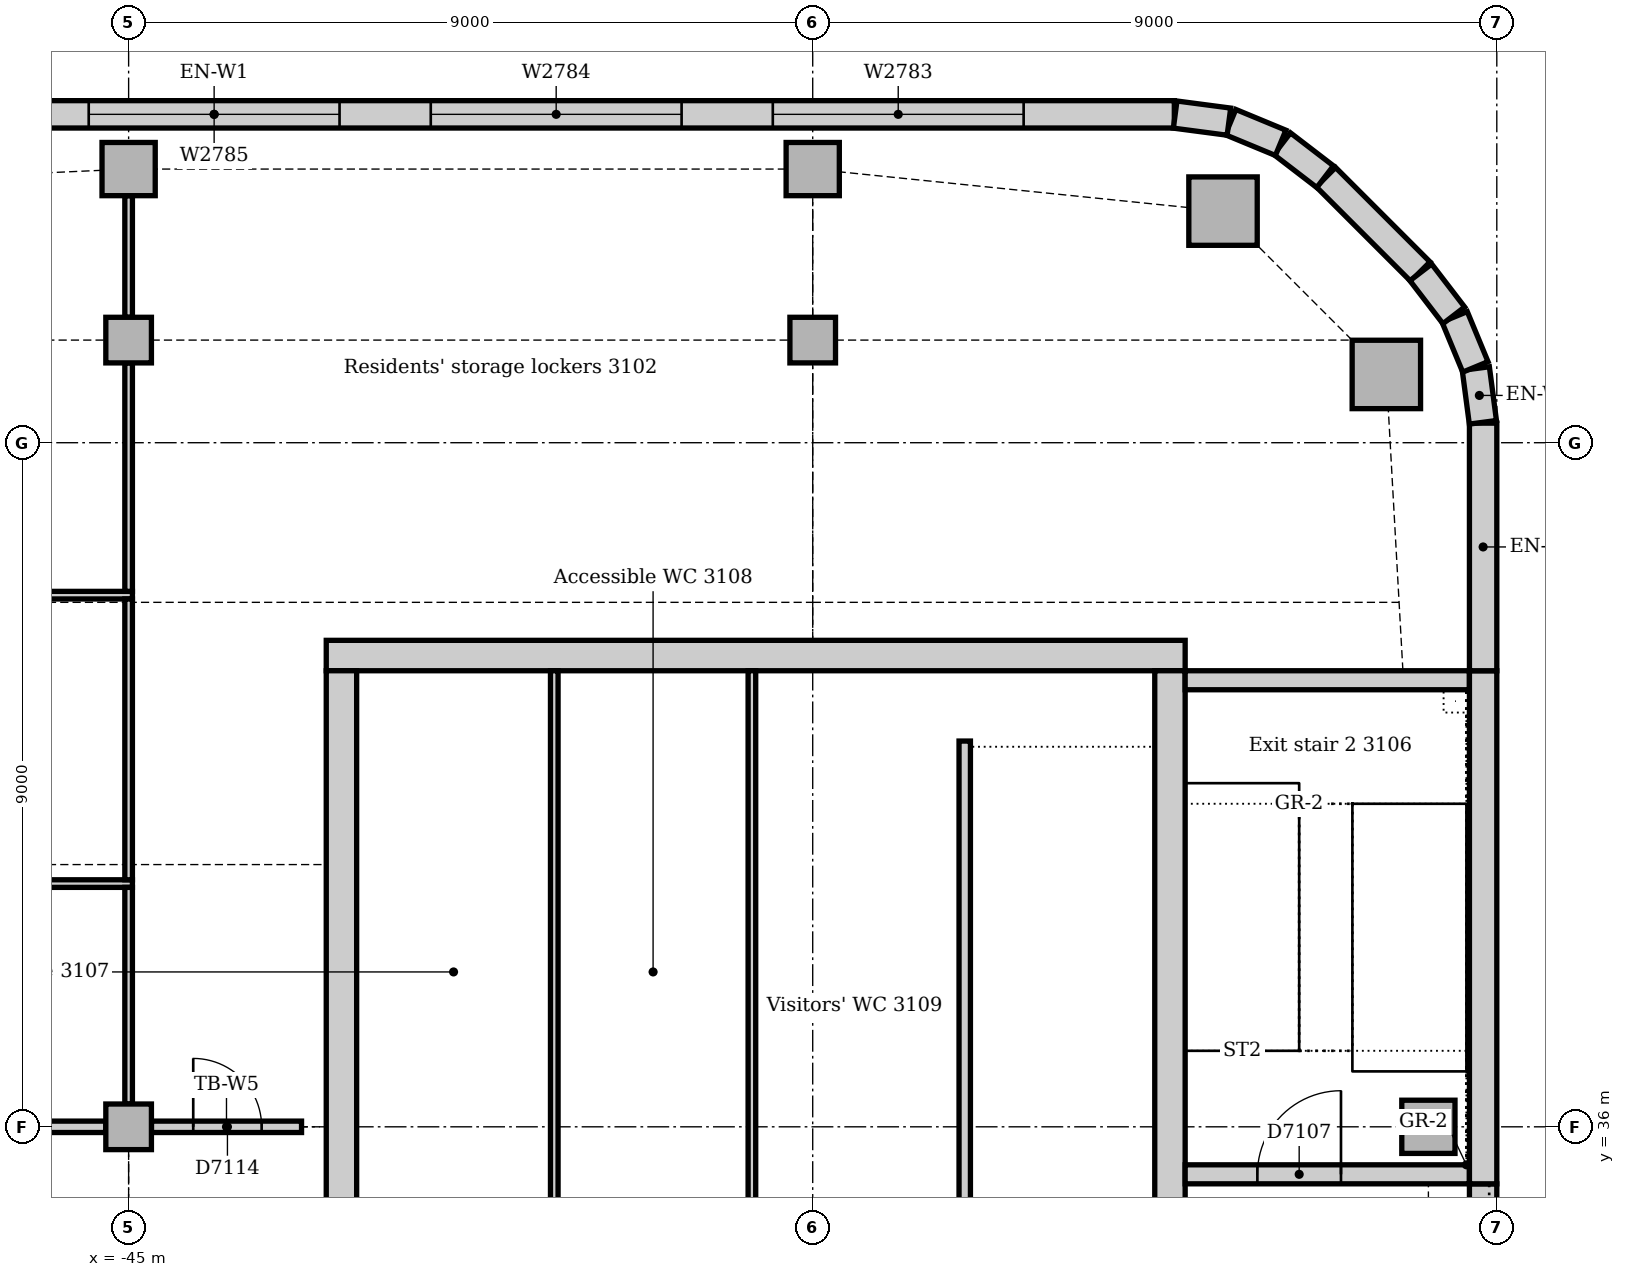
"""IFC4 building model, lengths in metres.
Left out: names, types, materials, properties, quantities, classifications, styles, units other than length and angle.
Written with IfcOpenShell. Run it as: python <this file> out.ifc"""

import sys

from ifc_helpers import new_model, si_unit, direction, frame, frame_2d, origin, origin_2d, place, context, subcontext, project, spatial, rectangle, extrude, element, fill, save


model = new_model("IFC4")
c1 = context("Model", 3, precision=1e-05, world=origin(), true_north=direction((0.0, 1.0)))
c2 = subcontext(c1, "Body", "Model", "MODEL_VIEW")
j1 = project(units=[si_unit("LENGTHUNIT", "METRE"), si_unit("PLANEANGLEUNIT", "RADIAN")], contexts=[c1])
p1 = place(None, origin())
s1 = spatial("IfcSite", under=j1, at=p1, CompositionType="ELEMENT")
p2 = place(p1, origin())
s2 = spatial("IfcBuilding", under=s1, at=p2, CompositionType="ELEMENT")
p3 = place(p2, frame((0.0, 0.0, 132.0)))
s3 = spatial("IfcBuildingStorey", under=s2, at=p3, CompositionType="ELEMENT", Elevation=132.0)
p4 = place(p3, frame((-31.1, 42.2, 0.0), z_axis=(0.0, 0.0, 1.0), x_axis=(-1.0, 0.0, 0.0)))
e1 = element("IfcWall", 1, at=p4, inside=s3, PredefinedType="SOLIDWALL", context=c2, shape_type="SweptSolid", body=[
    extrude(rectangle(XDim=11.3, YDim=0.4, at=frame_2d((5.65, 0.0))), origin(), (0.0, 0.0, 1.0), 4.0),
])
p5 = place(p3, frame((-31.3, 30.5, 0.0), z_axis=(0.0, 0.0, 1.0), x_axis=(0.0, 1.0, 0.0)))
e2 = element("IfcWall", 2, at=p5, inside=s3, PredefinedType="SOLIDWALL", context=c2, shape_type="SweptSolid", body=[
    extrude(rectangle(XDim=11.5, YDim=0.4, at=frame_2d((5.75, 0.0))), origin(), (0.0, 0.0, 1.0), 4.0),
])
p6 = place(p5, frame((0.85, 0.0, 0.0)))
e3 = element("IfcOpeningElement", 3, at=p6, cuts=e2, PredefinedType="OPENING", context=c2, shape_type="SweptSolid", body=[
    extrude(rectangle(XDim=1.8, YDim=2.1, at=frame_2d((0.9, 1.05))), frame((0.0, 0.21, 0.0), z_axis=(0.0, -1.0, 0.0), x_axis=(1.0, 0.0, 0.0)), (0.0, 0.0, 1.0), 0.42),
])
p7 = place(p3, frame((-42.2, 42.0, 0.0), z_axis=(0.0, 0.0, 1.0), x_axis=(0.0, -1.0, 0.0)))
e4 = element("IfcWall", 4, at=p7, inside=s3, PredefinedType="SOLIDWALL", context=c2, shape_type="SweptSolid", body=[
    extrude(rectangle(XDim=11.5, YDim=0.4, at=frame_2d((5.75, 0.0))), origin(), (0.0, 0.0, 1.0), 4.0),
])
p8 = place(p7, frame((8.85, 0.0, 0.0)))
e5 = element("IfcOpeningElement", 5, at=p8, cuts=e4, PredefinedType="OPENING", context=c2, shape_type="SweptSolid", body=[
    extrude(rectangle(XDim=1.8, YDim=2.1, at=frame_2d((0.9, 1.05))), frame((0.0, 0.21, 0.0), z_axis=(0.0, -1.0, 0.0), x_axis=(1.0, 0.0, 0.0)), (0.0, 0.0, 1.0), 0.42),
])
p9 = place(p3, frame((-31.1, 35.375, 0.0), z_axis=(0.0, 0.0, 1.0), x_axis=(1.0, 0.0, 0.0)))
e6 = element("IfcWall", 6, at=p9, inside=s3, PredefinedType="SOLIDWALL", context=c2, shape_type="SweptSolid", body=[
    extrude(rectangle(XDim=3.74, YDim=0.25, at=frame_2d((1.87, 0.0))), origin(), (0.0, 0.0, 1.0), 4.0),
])
p10 = place(p9, frame((0.95, 0.0, 0.0)))
e7 = element("IfcOpeningElement", 7, at=p10, cuts=e6, PredefinedType="OPENING", context=c2, shape_type="SweptSolid", body=[
    extrude(rectangle(XDim=1.1, YDim=2.1, at=frame_2d((0.55, 1.05))), frame((0.0, 0.135, 0.0), z_axis=(0.0, -1.0, 0.0), x_axis=(1.0, 0.0, 0.0)), (0.0, 0.0, 1.0), 0.27),
])
p11 = place(p3, frame((-27.36, 41.875, 0.0), z_axis=(0.0, 0.0, 1.0), x_axis=(-1.0, 0.0, 0.0)))
e8 = element("IfcWall", 8, at=p11, inside=s3, PredefinedType="SOLIDWALL", context=c2, shape_type="SweptSolid", body=[
    extrude(rectangle(XDim=3.74, YDim=0.25, at=frame_2d((1.87, 0.0))), origin(), (0.0, 0.0, 1.0), 4.0),
])
for number, where, z_axis, x_axis in (
    (9, (-28.453, 45.898, 0.0), (0.0, 0.0, 1.0), (1.0, 0.0, 0.0)),
    (10, (-30.602, 48.047, 0.0), (0.0, 0.0, 1.0), (1.0, 0.0, 0.0)),
):
    element("IfcColumn", number, at=place(p3, frame(where, z_axis=z_axis, x_axis=x_axis)), inside=s3, PredefinedType="COLUMN", context=c2, shape_type="SweptSolid", body=[
        extrude(rectangle(XDim=0.9, YDim=0.9, at=origin_2d()), origin(), (0.0, 0.0, 1.0), 3.85),
    ])
p12 = place(p3, frame((-27.9, 36.0, 0.0), z_axis=(0.0, 0.0, 1.0), x_axis=(1.0, 0.0, 0.0)))
e11 = element("IfcColumn", 11, at=p12, inside=s3, PredefinedType="COLUMN", context=c2, shape_type="SweptSolid", body=[
    extrude(rectangle(XDim=0.7, YDim=0.7, at=origin_2d()), origin(), (0.0, 0.0, 1.0), 4.0),
])
for number, where, z_axis, x_axis in (
    (12, (-45.0, 48.6, 0.0), (0.0, 0.0, 1.0), (1.0, 0.0, 0.0)),
    (13, (-36.0, 48.6, 0.0), (0.0, 0.0, 1.0), (1.0, 0.0, 0.0)),
):
    element("IfcColumn", number, at=place(p3, frame(where, z_axis=z_axis, x_axis=x_axis)), inside=s3, PredefinedType="COLUMN", context=c2, shape_type="SweptSolid", body=[
        extrude(rectangle(XDim=0.7, YDim=0.7, at=origin_2d()), origin(), (0.0, 0.0, 1.0), 3.85),
    ])
for number, where, z_axis, x_axis in (
    (14, (-45.0, 36.0, 0.0), (0.0, 0.0, 1.0), (1.0, 0.0, 0.0)),
    (15, (-45.0, 46.35, 0.0), (0.0, 0.0, 1.0), (1.0, 0.0, 0.0)),
    (16, (-36.0, 46.35, 0.0), (0.0, 0.0, 1.0), (1.0, 0.0, 0.0)),
):
    element("IfcColumn", number, at=place(p3, frame(where, z_axis=z_axis, x_axis=x_axis)), inside=s3, PredefinedType="COLUMN", context=c2, shape_type="SweptSolid", body=[
        extrude(rectangle(XDim=0.6, YDim=0.6, at=origin_2d()), origin(), (0.0, 0.0, 1.0), 3.85),
    ])
p13 = place(p3, frame((-27.18, 27.75, 0.0), z_axis=(0.0, 0.0, 1.0), x_axis=(0.0, 1.0, 0.0)))
e17 = element("IfcWall", 17, at=p13, inside=s3, PredefinedType="STANDARD", context=c2, shape_type="SweptSolid", body=[
    extrude(rectangle(XDim=7.5, YDim=0.36, at=frame_2d((3.75, 0.0))), origin(), (0.0, 0.0, 1.0), 3.85),
])
p14 = place(p13, frame((2.85, 0.0, 1.2)))
e18 = element("IfcOpeningElement", 18, at=p14, cuts=e17, PredefinedType="OPENING", context=c2, shape_type="SweptSolid", body=[
    extrude(rectangle(XDim=1.8, YDim=1.2, at=frame_2d((0.9, 0.6))), frame((0.0, 0.19, 0.0), z_axis=(0.0, -1.0, 0.0), x_axis=(1.0, 0.0, 0.0)), (0.0, 0.0, 1.0), 0.38),
])
p15 = place(p3, frame((-27.18, 35.25, 0.0), z_axis=(0.0, 0.0, 1.0), x_axis=(0.0, 1.0, 0.0)))
e19 = element("IfcWall", 19, at=p15, inside=s3, PredefinedType="STANDARD", context=c2, shape_type="SweptSolid", body=[
    extrude(rectangle(XDim=6.75, YDim=0.36, at=frame_2d((3.375, 0.0))), origin(), (0.0, 0.0, 1.0), 3.85),
])
p16 = place(p3, frame((-27.18, 42.0, 0.0), z_axis=(0.0, 0.0, 1.0), x_axis=(0.0, 1.0, 0.0)))
e20 = element("IfcWall", 20, at=p16, inside=s3, PredefinedType="STANDARD", context=c2, shape_type="SweptSolid", body=[
    extrude(rectangle(XDim=3.257, YDim=0.36, at=frame_2d((1.629, 0.0))), origin(), (0.0, 0.0, 1.0), 3.85),
])
p17 = place(p3, frame((-28.006, 47.251, 0.0), z_axis=(0.0, 0.0, 1.0), x_axis=(-0.707106781187, 0.707106781187, 0.0)))
e21 = element("IfcWall", 21, at=p17, inside=s3, PredefinedType="STANDARD", context=c2, shape_type="SweptSolid", body=[
    extrude(rectangle(XDim=1.757, YDim=0.36, at=frame_2d((0.879, 0.0))), origin(), (0.0, 0.0, 1.0), 3.85),
])
p18 = place(p3, frame((-31.243, 49.32, 0.0), z_axis=(0.0, 0.0, 1.0), x_axis=(-1.0, 0.0, 0.0)))
e22 = element("IfcWall", 22, at=p18, inside=s3, PredefinedType="STANDARD", context=c2, shape_type="SweptSolid", body=[
    extrude(rectangle(XDim=25.265, YDim=0.36, at=frame_2d((12.632, 0.0))), origin(), (0.0, 0.0, 1.0), 3.85),
])
p19 = place(p18, frame((1.982, 0.0, 0.9)))
e23 = element("IfcOpeningElement", 23, at=p19, cuts=e22, PredefinedType="OPENING", context=c2, shape_type="SweptSolid", body=[
    extrude(rectangle(XDim=3.3, YDim=1.6, at=frame_2d((1.65, 0.8))), frame((0.0, 0.19, 0.0), z_axis=(0.0, -1.0, 0.0), x_axis=(1.0, 0.0, 0.0)), (0.0, 0.0, 1.0), 0.38),
])
p20 = place(p18, frame((6.482, 0.0, 0.9)))
e24 = element("IfcOpeningElement", 24, at=p20, cuts=e22, PredefinedType="OPENING", context=c2, shape_type="SweptSolid", body=[
    extrude(rectangle(XDim=3.3, YDim=1.6, at=frame_2d((1.65, 0.8))), frame((0.0, 0.19, 0.0), z_axis=(0.0, -1.0, 0.0), x_axis=(1.0, 0.0, 0.0)), (0.0, 0.0, 1.0), 0.38),
])
p21 = place(p18, frame((10.982, 0.0, 0.9)))
e25 = element("IfcOpeningElement", 25, at=p21, cuts=e22, PredefinedType="OPENING", context=c2, shape_type="SweptSolid", body=[
    extrude(rectangle(XDim=3.3, YDim=1.6, at=frame_2d((1.65, 0.8))), frame((0.0, 0.19, 0.0), z_axis=(0.0, -1.0, 0.0), x_axis=(1.0, 0.0, 0.0)), (0.0, 0.0, 1.0), 0.38),
])
p22 = place(p18, frame((15.482, 0.0, 0.9)))
e26 = element("IfcOpeningElement", 26, at=p22, cuts=e22, PredefinedType="OPENING", context=c2, shape_type="SweptSolid", body=[
    extrude(rectangle(XDim=3.3, YDim=1.6, at=frame_2d((1.65, 0.8))), frame((0.0, 0.19, 0.0), z_axis=(0.0, -1.0, 0.0), x_axis=(1.0, 0.0, 0.0)), (0.0, 0.0, 1.0), 0.38),
])
p23 = place(p18, frame((19.982, 0.0, 0.9)))
e27 = element("IfcOpeningElement", 27, at=p23, cuts=e22, PredefinedType="OPENING", context=c2, shape_type="SweptSolid", body=[
    extrude(rectangle(XDim=3.3, YDim=1.6, at=frame_2d((1.65, 0.8))), frame((0.0, 0.19, 0.0), z_axis=(0.0, -1.0, 0.0), x_axis=(1.0, 0.0, 0.0)), (0.0, 0.0, 1.0), 0.38),
])
for number, where, z_axis, x_axis in (
    (28, (-27.183, 45.269, 0.0), (0.0, 0.0, 1.0), (-0.131, 0.991, 0.0)),
    (29, (-27.282, 45.997, 0.0), (0.0, 0.0, 1.0), (-0.383, 0.924, 0.0)),
):
    element("IfcWall", number, at=place(p3, frame(where, z_axis=z_axis, x_axis=x_axis)), inside=s3, PredefinedType="STANDARD", context=c2, shape_type="SweptSolid", body=[
        extrude(rectangle(XDim=0.713, YDim=0.36, at=frame_2d((0.356, 0.0))), origin(), (0.0, 0.0, 1.0), 3.85),
    ])
for number, where, z_axis, x_axis in (
    (30, (-27.566, 46.675, 0.0), (0.0, 0.0, 1.0), (-0.609, 0.793, 0.0)),
    (31, (-29.259, 48.5, 0.0), (0.0, 0.0, 1.0), (-0.793, 0.609, 0.0)),
):
    element("IfcWall", number, at=place(p3, frame(where, z_axis=z_axis, x_axis=x_axis)), inside=s3, PredefinedType="STANDARD", context=c2, shape_type="SweptSolid", body=[
        extrude(rectangle(XDim=0.713, YDim=0.36, at=frame_2d((0.357, 0.0))), origin(), (0.0, 0.0, 1.0), 3.85),
    ])
for number, where, z_axis, x_axis in (
    (32, (-29.844, 48.945, 0.0), (0.0, 0.0, 1.0), (-0.924, 0.383, 0.0)),
    (33, (-30.524, 49.224, 0.0), (0.0, 0.0, 1.0), (-0.991, 0.131, 0.0)),
):
    element("IfcWall", number, at=place(p3, frame(where, z_axis=z_axis, x_axis=x_axis)), inside=s3, PredefinedType="STANDARD", context=c2, shape_type="SweptSolid", body=[
        extrude(rectangle(XDim=0.713, YDim=0.36, at=frame_2d((0.356, 0.0))), origin(), (0.0, 0.0, 1.0), 3.85),
    ])
p24 = place(p3, frame((-34.0, 41.075, 0.0), z_axis=(0.0, 0.0, 1.0), x_axis=(0.0, -1.0, 0.0)))
e34 = element("IfcWall", 34, at=p24, inside=s3, PredefinedType="SOLIDWALL", context=c2, shape_type="SweptSolid", body=[
    extrude(rectangle(XDim=7.0, YDim=0.15, at=frame_2d((3.5, 0.0))), origin(), (0.0, 0.0, 1.0), 4.0),
])
for number, where, z_axis, x_axis in (
    (35, (-39.4, 34.075, 0.0), (0.0, 0.0, 1.0), (0.0, 1.0, 0.0)),
    (36, (-36.8, 34.075, 0.0), (0.0, 0.0, 1.0), (0.0, 1.0, 0.0)),
):
    element("IfcWall", number, at=place(p3, frame(where, z_axis=z_axis, x_axis=x_axis)), inside=s3, PredefinedType="PARTITIONING", context=c2, shape_type="SweptSolid", body=[
        extrude(rectangle(XDim=7.925, YDim=0.1, at=frame_2d((3.962, 0.0))), origin(), (0.0, 0.0, 1.0), 3.85),
    ])
p25 = place(p3, frame((-44.7, 36.0, 0.0), z_axis=(0.0, 0.0, 1.0), x_axis=(1.0, 0.0, 0.0)))
e37 = element("IfcWall", 37, at=p25, inside=s3, PredefinedType="PARTITIONING", context=c2, shape_type="SweptSolid", body=[
    extrude(rectangle(XDim=1.975, YDim=0.15, at=frame_2d((0.988, 0.0))), origin(), (0.0, 0.0, 1.0), 3.602),
])
p26 = place(p25, frame((0.55, 0.0, 0.0)))
e38 = element("IfcOpeningElement", 38, at=p26, cuts=e37, PredefinedType="OPENING", context=c2, shape_type="SweptSolid", body=[
    extrude(rectangle(XDim=0.9, YDim=2.1, at=frame_2d((0.45, 1.05))), frame((0.0, 0.085, 0.0), z_axis=(0.0, -1.0, 0.0), x_axis=(1.0, 0.0, 0.0)), (0.0, 0.0, 1.0), 0.17),
])
p27 = place(p3, frame((-53.7, 36.0, 0.0), z_axis=(0.0, 0.0, 1.0), x_axis=(1.0, 0.0, 0.0)))
e39 = element("IfcWall", 39, at=p27, inside=s3, PredefinedType="PARTITIONING", context=c2, shape_type="SweptSolid", body=[
    extrude(rectangle(XDim=8.4, YDim=0.15, at=frame_2d((4.2, 0.0))), origin(), (0.0, 0.0, 1.0), 3.262),
])
p28 = place(p27, frame((0.3, 0.0, 0.0)))
e40 = element("IfcOpeningElement", 40, at=p28, cuts=e39, PredefinedType="OPENING", context=c2, shape_type="SweptSolid", body=[
    extrude(rectangle(XDim=1.0, YDim=2.1, at=frame_2d((0.5, 1.05))), frame((0.0, 0.085, 0.0), z_axis=(0.0, -1.0, 0.0), x_axis=(1.0, 0.0, 0.0)), (0.0, 0.0, 1.0), 0.17),
])
p29 = place(p3, frame((-60.39, 39.2, 0.0), z_axis=(0.0, 0.0, 1.0), x_axis=(1.0, 0.0, 0.0)))
e41 = element("IfcWall", 41, at=p29, inside=s3, PredefinedType="PARTITIONING", context=c2, shape_type="SweptSolid", body=[
    extrude(rectangle(XDim=15.44, YDim=0.1, at=frame_2d((7.72, 0.0))), origin(), (0.0, 0.0, 1.0), 3.85),
])
p30 = place(p29, frame((6.021, 0.0, 0.0)))
e42 = element("IfcOpeningElement", 42, at=p30, cuts=e41, PredefinedType="OPENING", context=c2, shape_type="SweptSolid", body=[
    extrude(rectangle(XDim=0.9, YDim=2.1, at=frame_2d((0.45, 1.05))), frame((0.0, 0.06, 0.0), z_axis=(0.0, -1.0, 0.0), x_axis=(1.0, 0.0, 0.0)), (0.0, 0.0, 1.0), 0.12),
])
p31 = place(p3, frame((-60.39, 42.994, 0.0), z_axis=(0.0, 0.0, 1.0), x_axis=(1.0, 0.0, 0.0)))
e43 = element("IfcWall", 43, at=p31, inside=s3, PredefinedType="PARTITIONING", context=c2, shape_type="SweptSolid", body=[
    extrude(rectangle(XDim=15.44, YDim=0.1, at=frame_2d((7.72, 0.0))), origin(), (0.0, 0.0, 1.0), 3.4),
])
p32 = place(p31, frame((4.5, 0.0, 0.0)))
e44 = element("IfcOpeningElement", 44, at=p32, cuts=e43, PredefinedType="OPENING", context=c2, shape_type="SweptSolid", body=[
    extrude(rectangle(XDim=0.9, YDim=2.1, at=frame_2d((0.45, 1.05))), frame((0.0, 0.06, 0.0), z_axis=(0.0, -1.0, 0.0), x_axis=(1.0, 0.0, 0.0)), (0.0, 0.0, 1.0), 0.12),
])
p33 = place(p31, frame((12.06, 0.0, 0.0)))
e45 = element("IfcOpeningElement", 45, at=p33, cuts=e43, PredefinedType="OPENING", context=c2, shape_type="SweptSolid", body=[
    extrude(rectangle(XDim=0.9, YDim=2.1, at=frame_2d((0.45, 1.05))), frame((0.0, 0.06, 0.0), z_axis=(0.0, -1.0, 0.0), x_axis=(1.0, 0.0, 0.0)), (0.0, 0.0, 1.0), 0.12),
])
p34 = place(p3, frame((-45.0, 43.044, 0.0), z_axis=(0.0, 0.0, 1.0), x_axis=(0.0, 1.0, 0.0)))
e46 = element("IfcWall", 46, at=p34, inside=s3, PredefinedType="PARTITIONING", context=c2, shape_type="SweptSolid", body=[
    extrude(rectangle(XDim=3.006, YDim=0.1, at=frame_2d((1.503, 0.0))), origin(), (0.0, 0.0, 1.0), 3.362),
])
p35 = place(p3, frame((-45.0, 39.25, 0.0), z_axis=(0.0, 0.0, 1.0), x_axis=(0.0, 1.0, 0.0)))
e47 = element("IfcWall", 47, at=p35, inside=s3, PredefinedType="PARTITIONING", context=c2, shape_type="SweptSolid", body=[
    extrude(rectangle(XDim=3.694, YDim=0.1, at=frame_2d((1.847, 0.0))), origin(), (0.0, 0.0, 1.0), 3.362),
])
p36 = place(p3, frame((-45.0, 36.3, 0.0), z_axis=(0.0, 0.0, 1.0), x_axis=(0.0, 1.0, 0.0)))
e48 = element("IfcWall", 48, at=p36, inside=s3, PredefinedType="PARTITIONING", context=c2, shape_type="SweptSolid", body=[
    extrude(rectangle(XDim=2.85, YDim=0.1, at=frame_2d((1.425, 0.0))), origin(), (0.0, 0.0, 1.0), 3.362),
])
p37 = place(p3, frame((-45.0, 46.65, 0.0), z_axis=(0.0, 0.0, 1.0), x_axis=(0.0, 1.0, 0.0)))
e49 = element("IfcWall", 49, at=p37, inside=s3, PredefinedType="PARTITIONING", context=c2, shape_type="SweptSolid", body=[
    extrude(rectangle(XDim=1.6, YDim=0.1, at=frame_2d((0.8, 0.0))), origin(), (0.0, 0.0, 1.0), 3.652),
])
p38 = place(p19, origin())
e50 = element("IfcWindow", 50, at=p38, inside=s3, PartitioningType="SINGLE_PANEL", PredefinedType="WINDOW", context=c2, shape_type="SweptSolid", body=[
    extrude(rectangle(XDim=3.3, YDim=1.6, at=frame_2d((1.65, 0.8))), frame((0.0, 0.13, 0.0), z_axis=(0.0, -1.0, 0.0), x_axis=(1.0, 0.0, 0.0)), (0.0, 0.0, 1.0), 0.06),
])
fill(e23, e50)
p39 = place(p20, origin())
e51 = element("IfcWindow", 51, at=p39, inside=s3, PartitioningType="SINGLE_PANEL", PredefinedType="WINDOW", context=c2, shape_type="SweptSolid", body=[
    extrude(rectangle(XDim=3.3, YDim=1.6, at=frame_2d((1.65, 0.8))), frame((0.0, 0.13, 0.0), z_axis=(0.0, -1.0, 0.0), x_axis=(1.0, 0.0, 0.0)), (0.0, 0.0, 1.0), 0.06),
])
fill(e24, e51)
p40 = place(p21, origin())
e52 = element("IfcWindow", 52, at=p40, inside=s3, PartitioningType="SINGLE_PANEL", PredefinedType="WINDOW", context=c2, shape_type="SweptSolid", body=[
    extrude(rectangle(XDim=3.3, YDim=1.6, at=frame_2d((1.65, 0.8))), frame((0.0, 0.13, 0.0), z_axis=(0.0, -1.0, 0.0), x_axis=(1.0, 0.0, 0.0)), (0.0, 0.0, 1.0), 0.06),
])
fill(e25, e52)
p41 = place(p10, origin())
e53 = element("IfcDoor", 53, at=p41, inside=s3, OperationType="SINGLE_SWING_RIGHT", PredefinedType="DOOR", context=c2, shape_type="SweptSolid", body=[
    extrude(rectangle(XDim=1.1, YDim=2.1, at=frame_2d((0.55, 1.05))), frame((0.0, 0.025, 0.0), z_axis=(0.0, -1.0, 0.0), x_axis=(1.0, 0.0, 0.0)), (0.0, 0.0, 1.0), 0.05),
])
fill(e7, e53)
p42 = place(p26, origin())
e54 = element("IfcDoor", 54, at=p42, inside=s3, OperationType="SINGLE_SWING_LEFT", PredefinedType="DOOR", context=c2, shape_type="SweptSolid", body=[
    extrude(rectangle(XDim=0.9, YDim=2.1, at=frame_2d((0.45, 1.05))), frame((0.0, 0.025, 0.0), z_axis=(0.0, -1.0, 0.0), x_axis=(1.0, 0.0, 0.0)), (0.0, 0.0, 1.0), 0.05),
])
fill(e38, e54)
save(model, sys.argv[1])
